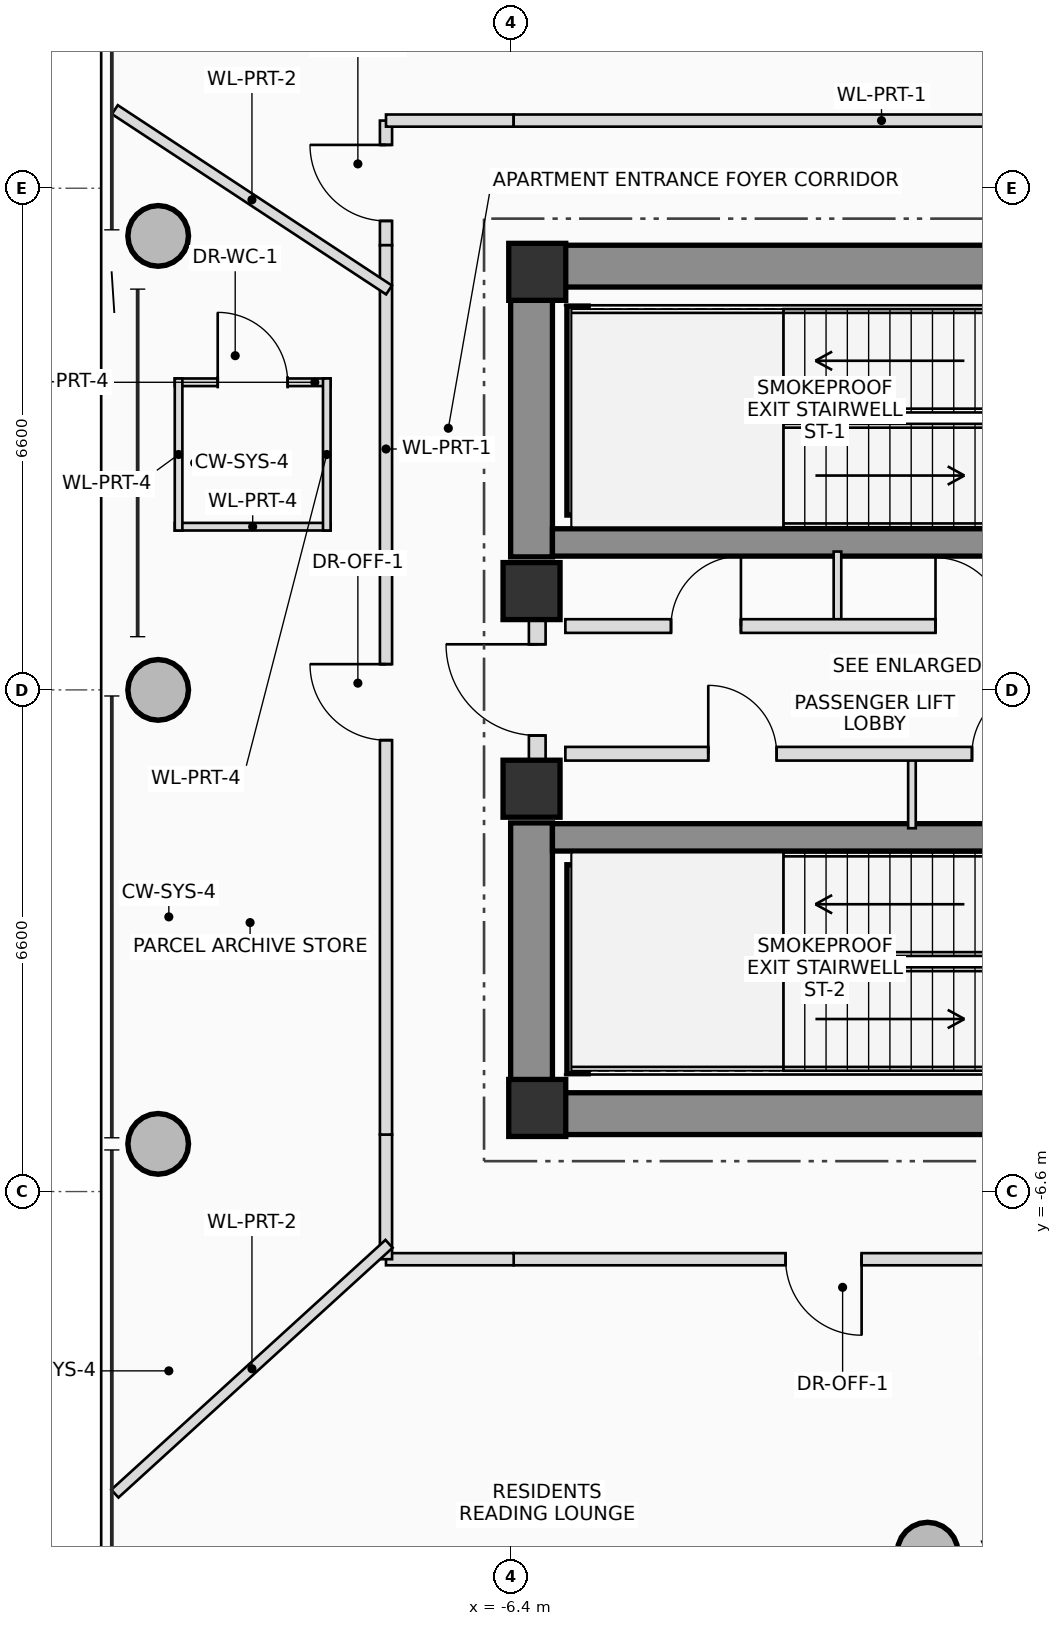
"""IFC4 building model, lengths in metres.
Left out: names, types, materials, properties, quantities, classifications, styles, units other than length and angle.
Written with IfcOpenShell. Run it as: python <this file> out.ifc"""

import sys

from ifc_helpers import new_model, si_unit, direction, frame, frame_2d, origin, origin_2d, place, context, subcontext, project, spatial, rectangle, hollow_circle, extrude, source, transform, mapped, element, fill, save


model = new_model("IFC4")
c1 = context("Model", 3, precision=1e-05, world=origin(), true_north=direction((0.0, 1.0)))
c2 = subcontext(c1, "Body", "Model", "MODEL_VIEW")
j1 = project(units=[si_unit("LENGTHUNIT", "METRE"), si_unit("PLANEANGLEUNIT", "RADIAN")], contexts=[c1])
p1 = place(None, origin())
s1 = spatial("IfcSite", under=j1, at=p1, CompositionType="ELEMENT")
p2 = place(p1, origin())
s2 = spatial("IfcBuilding", under=s1, at=p2, CompositionType="ELEMENT")
p3 = place(p2, frame((0.0, 0.0, 289.85)))
s3 = spatial("IfcBuildingStorey", under=s2, at=p3, CompositionType="ELEMENT", Elevation=289.85)
m1 = source(origin(), c2, "Body", "SweptSolid", [
    extrude(rectangle(XDim=0.75, YDim=0.75, at=origin_2d()), origin(), (0.0, 0.0, 1.0), 3.45),
])
for number, where, z_axis, x_axis in (
    (1, (-6.05, -5.5, 0.0), (0.0, 0.0, 1.0), (1.0, 0.0, 0.0)),
    (2, (-6.05, 5.5, 0.0), (0.0, 0.0, 1.0), (1.0, 0.0, 0.0)),
):
    element("IfcColumn", number, at=place(p3, frame(where, z_axis=z_axis, x_axis=x_axis)), inside=s3, PredefinedType="COLUMN", context=c2, shape_type="MappedRepresentation", body=[
        mapped(m1, transform((0.0, 0.0, 0.0), scale=1.0)),
    ])
p4 = place(p3, frame((-6.4, 5.575, 0.0), z_axis=(0.0, 0.0, 1.0), x_axis=(1.0, 0.0, 0.0)))
e3 = element("IfcWall", 3, at=p4, inside=s3, PredefinedType="SHEAR", context=c2, shape_type="SweptSolid", body=[
    extrude(rectangle(XDim=12.8, YDim=0.55, at=frame_2d((6.4, 0.0))), origin(), (0.0, 0.0, 1.0), 3.45),
])
p5 = place(p4, frame((8.6, 0.0, 0.0)))
e4 = element("IfcOpeningElement", 4, at=p5, cuts=e3, PredefinedType="OPENING", context=c2, shape_type="SweptSolid", body=[
    extrude(rectangle(XDim=1.2, YDim=2.2, at=frame_2d((0.6, 1.1))), frame((0.0, 0.285, 0.0), z_axis=(0.0, -1.0, 0.0), x_axis=(1.0, 0.0, 0.0)), (0.0, 0.0, 1.0), 0.57),
])
p6 = place(p3, frame((-6.4, -5.575, 0.0), z_axis=(0.0, 0.0, 1.0), x_axis=(1.0, 0.0, 0.0)))
e5 = element("IfcWall", 5, at=p6, inside=s3, PredefinedType="SHEAR", context=c2, shape_type="SweptSolid", body=[
    extrude(rectangle(XDim=12.8, YDim=0.55, at=frame_2d((6.4, 0.0))), origin(), (0.0, 0.0, 1.0), 3.45),
])
p7 = place(p6, frame((8.6, 0.0, 0.0)))
e6 = element("IfcOpeningElement", 6, at=p7, cuts=e5, PredefinedType="OPENING", context=c2, shape_type="SweptSolid", body=[
    extrude(rectangle(XDim=1.2, YDim=2.2, at=frame_2d((0.6, 1.1))), frame((0.0, 0.285, 0.0), z_axis=(0.0, -1.0, 0.0), x_axis=(1.0, 0.0, 0.0)), (0.0, 0.0, 1.0), 0.57),
])
for number, where, z_axis, x_axis in (
    (7, (-6.125, -5.3, 0.0), (0.0, 0.0, 1.0), (0.0, 1.0, 0.0)),
    (8, (-6.125, 1.75, 0.0), (0.0, 0.0, 1.0), (0.0, 1.0, 0.0)),
):
    element("IfcWall", number, at=place(p3, frame(where, z_axis=z_axis, x_axis=x_axis)), inside=s3, PredefinedType="SHEAR", context=c2, shape_type="SweptSolid", body=[
        extrude(rectangle(XDim=3.55, YDim=0.55, at=frame_2d((1.775, 0.0))), origin(), (0.0, 0.0, 1.0), 3.45),
    ])
for number, where, z_axis, x_axis in (
    (9, (-5.85, 1.94, 0.0), (0.0, 0.0, 1.0), (1.0, 0.0, 0.0)),
    (10, (-5.85, -1.94, 0.0), (0.0, 0.0, 1.0), (1.0, 0.0, 0.0)),
):
    element("IfcWall", number, at=place(p3, frame(where, z_axis=z_axis, x_axis=x_axis)), inside=s3, PredefinedType="SHEAR", context=c2, shape_type="SweptSolid", body=[
        extrude(rectangle(XDim=11.7, YDim=0.36, at=frame_2d((5.85, 0.0))), origin(), (0.0, 0.0, 1.0), 3.45),
    ])
for number, where, z_axis, x_axis in (
    (11, (-5.52, 2.3, 0.0), (0.0, 0.0, 1.0), (0.0, 1.0, 0.0)),
    (12, (-5.52, -5.05, 0.0), (0.0, 0.0, 1.0), (0.0, 1.0, 0.0)),
):
    element("IfcWall", number, at=place(p3, frame(where, z_axis=z_axis, x_axis=x_axis)), inside=s3, PredefinedType="SHEAR", context=c2, shape_type="SweptSolid", body=[
        extrude(rectangle(XDim=2.75, YDim=0.28, at=frame_2d((1.375, 0.0))), origin(), (0.0, 0.0, 1.0), 3.45),
    ])
for number, where, z_axis, x_axis in (
    (13, (-6.125, -1.3, 0.0), (0.0, 0.0, 1.0), (1.0, 0.0, 0.0)),
    (14, (-6.125, 1.3, 0.0), (0.0, 0.0, 1.0), (1.0, 0.0, 0.0)),
):
    element("IfcColumn", number, at=place(p3, frame(where, z_axis=z_axis, x_axis=x_axis)), inside=s3, PredefinedType="COLUMN", context=c2, shape_type="MappedRepresentation", body=[
        mapped(m1, transform((0.0, 0.0, 0.0), scale=1.0)),
    ])
m2 = source(origin(), c2, "Body", "SweptSolid", [
    extrude(hollow_circle(Radius=0.4, WallThickness=0.028, at=origin_2d()), origin(), (0.0, 0.0, 1.0), 3.45),
])
for number, where, z_axis, x_axis in (
    (15, (-0.914, -11.35, 0.0), (0.0, 0.0, 1.0), (1.0, 0.0, 0.0)),
    (16, (-11.037, 5.973, 0.0), (0.0, 0.0, 1.0), (1.0, 0.0, 0.0)),
    (17, (-11.037, 0.0, 0.0), (0.0, 0.0, 1.0), (1.0, 0.0, 0.0)),
    (18, (-11.037, -5.973, 0.0), (0.0, 0.0, 1.0), (1.0, 0.0, 0.0)),
):
    element("IfcColumn", number, at=place(p3, frame(where, z_axis=z_axis, x_axis=x_axis)), inside=s3, PredefinedType="COLUMN", context=c2, shape_type="MappedRepresentation", body=[
        mapped(m2, transform((0.0, 0.0, 0.0), scale=1.0)),
    ])
p8 = place(p3, frame((-6.05, -0.95, 0.0), z_axis=(0.0, 0.0, 1.0), x_axis=(0.0, 1.0, 0.0)))
e19 = element("IfcWall", 19, at=p8, inside=s3, PredefinedType="PLUMBINGWALL", context=c2, shape_type="SweptSolid", body=[
    extrude(rectangle(XDim=1.9, YDim=0.22, at=frame_2d((0.95, 0.0))), origin(), (0.0, 0.0, 1.0), 2.23),
])
p9 = place(p8, frame((0.35, 0.0, 0.0)))
e20 = element("IfcOpeningElement", 20, at=p9, cuts=e19, PredefinedType="OPENING", context=c2, shape_type="SweptSolid", body=[
    extrude(rectangle(XDim=1.2, YDim=2.2, at=frame_2d((0.6, 1.1))), frame((0.0, 0.12, 0.0), z_axis=(0.0, -1.0, 0.0), x_axis=(1.0, 0.0, 0.0)), (0.0, 0.0, 1.0), 0.24),
])
for number, where, z_axis, x_axis in (
    (21, (-2.1, 0.84, 0.0), (0.0, 0.0, 1.0), (0.0, 1.0, 0.0)),
    (22, (-1.12, -1.82, 0.0), (0.0, 0.0, 1.0), (0.0, 1.0, 0.0)),
):
    element("IfcWall", number, at=place(p3, frame(where, z_axis=z_axis, x_axis=x_axis)), inside=s3, PredefinedType="PARTITIONING", context=c2, shape_type="SweptSolid", body=[
        extrude(rectangle(XDim=0.98, YDim=0.1, at=frame_2d((0.49, 0.0))), origin(), (0.0, 0.0, 1.0), 3.25),
    ])
p10 = place(p3, frame((-5.68, 0.84, 0.0), z_axis=(0.0, 0.0, 1.0), x_axis=(1.0, 0.0, 0.0)))
e23 = element("IfcWall", 23, at=p10, inside=s3, PredefinedType="PLUMBINGWALL", context=c2, shape_type="SweptSolid", body=[
    extrude(rectangle(XDim=11.33, YDim=0.18, at=frame_2d((5.665, 0.0))), origin(), (0.0, 0.0, 1.0), 3.25),
])
p11 = place(p10, frame((1.39, 0.0, 0.0)))
e24 = element("IfcOpeningElement", 24, at=p11, cuts=e23, PredefinedType="OPENING", context=c2, shape_type="SweptSolid", body=[
    extrude(rectangle(XDim=0.92, YDim=2.1, at=frame_2d((0.46, 1.05))), frame((0.0, 0.1, 0.0), z_axis=(0.0, -1.0, 0.0), x_axis=(1.0, 0.0, 0.0)), (0.0, 0.0, 1.0), 0.2),
])
p12 = place(p10, frame((4.87, 0.0, 0.0)))
e25 = element("IfcOpeningElement", 25, at=p12, cuts=e23, PredefinedType="OPENING", context=c2, shape_type="SweptSolid", body=[
    extrude(rectangle(XDim=0.9, YDim=2.05, at=frame_2d((0.45, 1.025))), frame((0.0, 0.1, 0.0), z_axis=(0.0, -1.0, 0.0), x_axis=(1.0, 0.0, 0.0)), (0.0, 0.0, 1.0), 0.2),
])
p13 = place(p10, frame((7.33, 0.0, 0.0)))
e26 = element("IfcOpeningElement", 26, at=p13, cuts=e23, PredefinedType="OPENING", context=c2, shape_type="SweptSolid", body=[
    extrude(rectangle(XDim=1.1, YDim=2.2, at=frame_2d((0.55, 1.1))), frame((0.0, 0.1, 0.0), z_axis=(0.0, -1.0, 0.0), x_axis=(1.0, 0.0, 0.0)), (0.0, 0.0, 1.0), 0.2),
])
p14 = place(p10, frame((8.83, 0.0, 0.0)))
e27 = element("IfcOpeningElement", 27, at=p14, cuts=e23, PredefinedType="OPENING", context=c2, shape_type="SweptSolid", body=[
    extrude(rectangle(XDim=1.1, YDim=2.2, at=frame_2d((0.55, 1.1))), frame((0.0, 0.1, 0.0), z_axis=(0.0, -1.0, 0.0), x_axis=(1.0, 0.0, 0.0)), (0.0, 0.0, 1.0), 0.2),
])
p15 = place(p10, frame((10.25, 0.0, 0.0)))
e28 = element("IfcOpeningElement", 28, at=p15, cuts=e23, PredefinedType="OPENING", context=c2, shape_type="SweptSolid", body=[
    extrude(rectangle(XDim=0.9, YDim=2.05, at=frame_2d((0.45, 1.025))), frame((0.0, 0.1, 0.0), z_axis=(0.0, -1.0, 0.0), x_axis=(1.0, 0.0, 0.0)), (0.0, 0.0, 1.0), 0.2),
])
p16 = place(p3, frame((-5.68, -0.84, 0.0), z_axis=(0.0, 0.0, 1.0), x_axis=(1.0, 0.0, 0.0)))
e29 = element("IfcWall", 29, at=p16, inside=s3, PredefinedType="PLUMBINGWALL", context=c2, shape_type="SweptSolid", body=[
    extrude(rectangle(XDim=11.33, YDim=0.18, at=frame_2d((5.665, 0.0))), origin(), (0.0, 0.0, 1.0), 3.25),
])
p17 = place(p16, frame((1.88, 0.0, 0.0)))
e30 = element("IfcOpeningElement", 30, at=p17, cuts=e29, PredefinedType="OPENING", context=c2, shape_type="SweptSolid", body=[
    extrude(rectangle(XDim=0.9, YDim=2.05, at=frame_2d((0.45, 1.025))), frame((0.0, 0.1, 0.0), z_axis=(0.0, -1.0, 0.0), x_axis=(1.0, 0.0, 0.0)), (0.0, 0.0, 1.0), 0.2),
])
p18 = place(p16, frame((5.35, 0.0, 0.0)))
e31 = element("IfcOpeningElement", 31, at=p18, cuts=e29, PredefinedType="OPENING", context=c2, shape_type="SweptSolid", body=[
    extrude(rectangle(XDim=0.9, YDim=2.05, at=frame_2d((0.45, 1.025))), frame((0.0, 0.1, 0.0), z_axis=(0.0, -1.0, 0.0), x_axis=(1.0, 0.0, 0.0)), (0.0, 0.0, 1.0), 0.2),
])
p19 = place(p16, frame((7.33, 0.0, 0.0)))
e32 = element("IfcOpeningElement", 32, at=p19, cuts=e29, PredefinedType="OPENING", context=c2, shape_type="SweptSolid", body=[
    extrude(rectangle(XDim=1.1, YDim=2.2, at=frame_2d((0.55, 1.1))), frame((0.0, 0.1, 0.0), z_axis=(0.0, -1.0, 0.0), x_axis=(1.0, 0.0, 0.0)), (0.0, 0.0, 1.0), 0.2),
])
p20 = place(p16, frame((8.9, 0.0, 0.0)))
e33 = element("IfcOpeningElement", 33, at=p20, cuts=e29, PredefinedType="OPENING", context=c2, shape_type="SweptSolid", body=[
    extrude(rectangle(XDim=0.9, YDim=2.05, at=frame_2d((0.45, 1.025))), frame((0.0, 0.1, 0.0), z_axis=(0.0, -1.0, 0.0), x_axis=(1.0, 0.0, 0.0)), (0.0, 0.0, 1.0), 0.2),
])
p21 = place(p16, frame((10.25, 0.0, 0.0)))
e34 = element("IfcOpeningElement", 34, at=p21, cuts=e29, PredefinedType="OPENING", context=c2, shape_type="SweptSolid", body=[
    extrude(rectangle(XDim=0.9, YDim=2.05, at=frame_2d((0.45, 1.025))), frame((0.0, 0.1, 0.0), z_axis=(0.0, -1.0, 0.0), x_axis=(1.0, 0.0, 0.0)), (0.0, 0.0, 1.0), 0.2),
])
p22 = place(p3, frame((-10.819, 4.047, 0.0), z_axis=(0.0, 0.0, 1.0), x_axis=(1.0, 0.0, 0.0)))
e35 = element("IfcWall", 35, at=p22, inside=s3, PredefinedType="PARTITIONING", context=c2, shape_type="SweptSolid", body=[
    extrude(rectangle(XDim=2.05, YDim=0.1, at=frame_2d((1.025, 0.0))), origin(), (0.0, 0.0, 1.0), 2.905),
])
p23 = place(p22, frame((0.565, 0.0, 0.0)))
e36 = element("IfcOpeningElement", 36, at=p23, cuts=e35, PredefinedType="OPENING", context=c2, shape_type="SweptSolid", body=[
    extrude(rectangle(XDim=0.92, YDim=2.1, at=frame_2d((0.46, 1.05))), frame((0.0, 0.06, 0.0), z_axis=(0.0, -1.0, 0.0), x_axis=(1.0, 0.0, 0.0)), (0.0, 0.0, 1.0), 0.12),
])
p24 = place(p3, frame((-8.769, 2.147, 0.0), z_axis=(0.0, 0.0, 1.0), x_axis=(-1.0, 0.0, 0.0)))
e37 = element("IfcWall", 37, at=p24, inside=s3, PredefinedType="PARTITIONING", context=c2, shape_type="SweptSolid", body=[
    extrude(rectangle(XDim=2.05, YDim=0.1, at=frame_2d((1.025, 0.0))), origin(), (0.0, 0.0, 1.0), 2.905),
])
for number, where, z_axis, x_axis in (
    (38, (-8.819, 4.097, 0.0), (0.0, 0.0, 1.0), (0.0, -1.0, 0.0)),
    (39, (-10.769, 2.097, 0.0), (0.0, 0.0, 1.0), (0.0, 1.0, 0.0)),
):
    element("IfcWall", number, at=place(p3, frame(where, z_axis=z_axis, x_axis=x_axis)), inside=s3, PredefinedType="PARTITIONING", context=c2, shape_type="SweptSolid", body=[
        extrude(rectangle(XDim=2.0, YDim=0.1, at=frame_2d((1.0, 0.0))), origin(), (0.0, 0.0, 1.0), 3.25),
    ])
p25 = place(p3, frame((-8.04, 5.85, 0.0), z_axis=(0.0, 0.0, 1.0), x_axis=(0.0, 1.0, 0.0)))
e40 = element("IfcWall", 40, at=p25, inside=s3, PredefinedType="PARTITIONING", context=c2, shape_type="SweptSolid", body=[
    extrude(rectangle(XDim=1.64, YDim=0.16, at=frame_2d((0.82, 0.0))), origin(), (0.0, 0.0, 1.0), 2.905),
])
p26 = place(p25, frame((0.32, 0.0, 0.0)))
e41 = element("IfcOpeningElement", 41, at=p26, cuts=e40, PredefinedType="OPENING", context=c2, shape_type="SweptSolid", body=[
    extrude(rectangle(XDim=1.0, YDim=2.25, at=frame_2d((0.5, 1.125))), frame((0.0, 0.09, 0.0), z_axis=(0.0, -1.0, 0.0), x_axis=(1.0, 0.0, 0.0)), (0.0, 0.0, 1.0), 0.18),
])
p27 = place(p3, frame((-8.04, 7.49, 0.0), z_axis=(0.0, 0.0, 1.0), x_axis=(1.0, 0.0, 0.0)))
e42 = element("IfcWall", 42, at=p27, inside=s3, PredefinedType="PARTITIONING", context=c2, shape_type="SweptSolid", body=[
    extrude(rectangle(XDim=1.68, YDim=0.16, at=frame_2d((0.84, 0.0))), origin(), (0.0, 0.0, 1.0), 2.655),
])
p28 = place(p3, frame((-6.36, 7.49, 0.0), z_axis=(0.0, 0.0, 1.0), x_axis=(1.0, 0.0, 0.0)))
e43 = element("IfcWall", 43, at=p28, inside=s3, PredefinedType="PARTITIONING", context=c2, shape_type="SweptSolid", body=[
    extrude(rectangle(XDim=9.679, YDim=0.16, at=frame_2d((4.84, 0.0))), origin(), (0.0, 0.0, 1.0), 2.655),
])
p29 = place(p3, frame((3.319, -7.49, 0.0), z_axis=(0.0, 0.0, 1.0), x_axis=(-1.0, 0.0, 0.0)))
e44 = element("IfcWall", 44, at=p29, inside=s3, PredefinedType="PARTITIONING", context=c2, shape_type="SweptSolid", body=[
    extrude(rectangle(XDim=9.679, YDim=0.16, at=frame_2d((4.84, 0.0))), origin(), (0.0, 0.0, 1.0), 2.655),
])
p30 = place(p29, frame((5.101, 0.0, 0.0)))
e45 = element("IfcOpeningElement", 45, at=p30, cuts=e44, PredefinedType="OPENING", context=c2, shape_type="SweptSolid", body=[
    extrude(rectangle(XDim=1.0, YDim=2.25, at=frame_2d((0.5, 1.125))), frame((0.0, 0.09, 0.0), z_axis=(0.0, -1.0, 0.0), x_axis=(1.0, 0.0, 0.0)), (0.0, 0.0, 1.0), 0.18),
])
p31 = place(p3, frame((-6.36, -7.49, 0.0), z_axis=(0.0, 0.0, 1.0), x_axis=(-1.0, 0.0, 0.0)))
e46 = element("IfcWall", 46, at=p31, inside=s3, PredefinedType="PARTITIONING", context=c2, shape_type="SweptSolid", body=[
    extrude(rectangle(XDim=1.68, YDim=0.16, at=frame_2d((0.84, 0.0))), origin(), (0.0, 0.0, 1.0), 2.655),
])
p32 = place(p3, frame((-8.04, -7.49, 0.0), z_axis=(0.0, 0.0, 1.0), x_axis=(0.0, 1.0, 0.0)))
e47 = element("IfcWall", 47, at=p32, inside=s3, PredefinedType="PARTITIONING", context=c2, shape_type="SweptSolid", body=[
    extrude(rectangle(XDim=1.64, YDim=0.16, at=frame_2d((0.82, 0.0))), origin(), (0.0, 0.0, 1.0), 3.25),
])
p33 = place(p3, frame((-8.04, -5.85, 0.0), z_axis=(0.0, 0.0, 1.0), x_axis=(0.0, 1.0, 0.0)))
e48 = element("IfcWall", 48, at=p33, inside=s3, PredefinedType="PARTITIONING", context=c2, shape_type="SweptSolid", body=[
    extrude(rectangle(XDim=11.7, YDim=0.16, at=frame_2d((5.85, 0.0))), origin(), (0.0, 0.0, 1.0), 2.655),
])
p34 = place(p33, frame((5.189, 0.0, 0.0)))
e49 = element("IfcOpeningElement", 49, at=p34, cuts=e48, PredefinedType="OPENING", context=c2, shape_type="SweptSolid", body=[
    extrude(rectangle(XDim=1.0, YDim=2.25, at=frame_2d((0.5, 1.125))), frame((0.0, 0.09, 0.0), z_axis=(0.0, -1.0, 0.0), x_axis=(1.0, 0.0, 0.0)), (0.0, 0.0, 1.0), 0.18),
])
p35 = place(p3, frame((-8.0, 5.262, 0.0), z_axis=(0.0, 0.0, 1.0), x_axis=(-0.835496328285, 0.549496028578, 0.0)))
e50 = element("IfcWall", 50, at=p35, inside=s3, PredefinedType="PARTITIONING", context=c2, shape_type="SweptSolid", body=[
    extrude(rectangle(XDim=4.318, YDim=0.14, at=frame_2d((2.159, 0.0))), origin(), (0.0, 0.0, 1.0), 2.655),
])
p36 = place(p3, frame((-8.0, -7.288, 0.0), z_axis=(0.0, 0.0, 1.0), x_axis=(-0.739260540131, -0.673419522886, 0.0)))
e51 = element("IfcWall", 51, at=p36, inside=s3, PredefinedType="PARTITIONING", context=c2, shape_type="SweptSolid", body=[
    extrude(rectangle(XDim=4.88, YDim=0.14, at=frame_2d((2.44, 0.0))), origin(), (0.0, 0.0, 1.0), 2.815),
])
p37 = place(p9, origin())
e52 = element("IfcDoor", 52, at=p37, inside=s3, OperationType="SINGLE_SWING_RIGHT", PredefinedType="DOOR", context=c2, shape_type="SweptSolid", body=[
    extrude(rectangle(XDim=1.2, YDim=2.2, at=frame_2d((0.6, 1.1))), frame((0.0, 0.025, 0.0), z_axis=(0.0, -1.0, 0.0), x_axis=(1.0, 0.0, 0.0)), (0.0, 0.0, 1.0), 0.05),
])
fill(e20, e52)
p38 = place(p11, origin())
e53 = element("IfcDoor", 53, at=p38, inside=s3, OperationType="SINGLE_SWING_RIGHT", PredefinedType="DOOR", context=c2, shape_type="SweptSolid", body=[
    extrude(rectangle(XDim=0.92, YDim=2.1, at=frame_2d((0.46, 1.05))), frame((0.0, 0.025, 0.0), z_axis=(0.0, -1.0, 0.0), x_axis=(1.0, 0.0, 0.0)), (0.0, 0.0, 1.0), 0.05),
])
fill(e24, e53)
p39 = place(p12, origin())
e54 = element("IfcDoor", 54, at=p39, inside=s3, OperationType="SINGLE_SWING_LEFT", PredefinedType="DOOR", context=c2, shape_type="SweptSolid", body=[
    extrude(rectangle(XDim=0.9, YDim=2.05, at=frame_2d((0.45, 1.025))), frame((0.0, 0.025, 0.0), z_axis=(0.0, -1.0, 0.0), x_axis=(1.0, 0.0, 0.0)), (0.0, 0.0, 1.0), 0.05),
])
fill(e25, e54)
p40 = place(p17, origin())
e55 = element("IfcDoor", 55, at=p40, inside=s3, OperationType="SINGLE_SWING_LEFT", PredefinedType="DOOR", context=c2, shape_type="SweptSolid", body=[
    extrude(rectangle(XDim=0.9, YDim=2.05, at=frame_2d((0.45, 1.025))), frame((0.0, 0.025, 0.0), z_axis=(0.0, -1.0, 0.0), x_axis=(1.0, 0.0, 0.0)), (0.0, 0.0, 1.0), 0.05),
])
fill(e30, e55)
p41 = place(p18, origin())
e56 = element("IfcDoor", 56, at=p41, inside=s3, OperationType="SINGLE_SWING_RIGHT", PredefinedType="DOOR", context=c2, shape_type="SweptSolid", body=[
    extrude(rectangle(XDim=0.9, YDim=2.05, at=frame_2d((0.45, 1.025))), frame((0.0, 0.025, 0.0), z_axis=(0.0, -1.0, 0.0), x_axis=(1.0, 0.0, 0.0)), (0.0, 0.0, 1.0), 0.05),
])
fill(e31, e56)
p42 = place(p23, origin())
e57 = element("IfcDoor", 57, at=p42, inside=s3, OperationType="SINGLE_SWING_LEFT", PredefinedType="DOOR", context=c2, shape_type="SweptSolid", body=[
    extrude(rectangle(XDim=0.92, YDim=2.1, at=frame_2d((0.46, 1.05))), frame((0.0, 0.025, 0.0), z_axis=(0.0, -1.0, 0.0), x_axis=(1.0, 0.0, 0.0)), (0.0, 0.0, 1.0), 0.05),
])
fill(e36, e57)
p43 = place(p26, origin())
e58 = element("IfcDoor", 58, at=p43, inside=s3, OperationType="SINGLE_SWING_RIGHT", PredefinedType="DOOR", context=c2, shape_type="SweptSolid", body=[
    extrude(rectangle(XDim=1.0, YDim=2.25, at=frame_2d((0.5, 1.125))), frame((0.0, 0.025, 0.0), z_axis=(0.0, -1.0, 0.0), x_axis=(1.0, 0.0, 0.0)), (0.0, 0.0, 1.0), 0.05),
])
fill(e41, e58)
p44 = place(p30, origin())
e59 = element("IfcDoor", 59, at=p44, inside=s3, OperationType="SINGLE_SWING_LEFT", PredefinedType="DOOR", context=c2, shape_type="SweptSolid", body=[
    extrude(rectangle(XDim=1.0, YDim=2.25, at=frame_2d((0.5, 1.125))), frame((0.0, 0.025, 0.0), z_axis=(0.0, -1.0, 0.0), x_axis=(1.0, 0.0, 0.0)), (0.0, 0.0, 1.0), 0.05),
])
fill(e45, e59)
p45 = place(p34, origin())
e60 = element("IfcDoor", 60, at=p45, inside=s3, OperationType="SINGLE_SWING_RIGHT", PredefinedType="DOOR", context=c2, shape_type="SweptSolid", body=[
    extrude(rectangle(XDim=1.0, YDim=2.25, at=frame_2d((0.5, 1.125))), frame((0.0, 0.025, 0.0), z_axis=(0.0, -1.0, 0.0), x_axis=(1.0, 0.0, 0.0)), (0.0, 0.0, 1.0), 0.05),
])
fill(e49, e60)
save(model, sys.argv[1])
